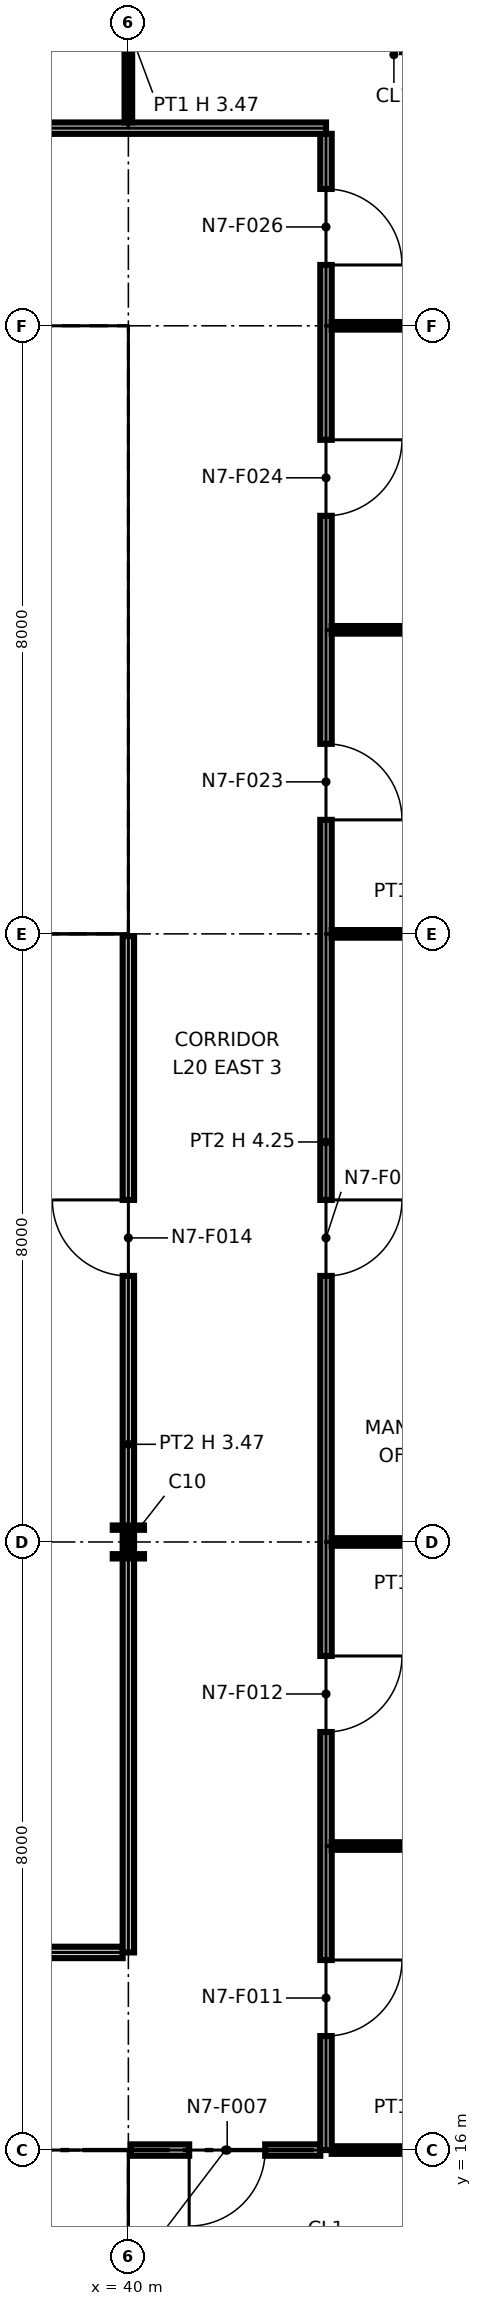
"""IFC4 building model, lengths in metres.
Left out: names, types, materials, properties, quantities, classifications, styles, units other than length and angle.
Written with IfcOpenShell. Run it as: python <this file> out.ifc"""

import sys

from ifc_helpers import new_model, si_unit, direction, frame, frame_2d, origin, origin_2d, place, context, subcontext, project, spatial, polyline, rectangle, i_section, outline, extrude, element, fill, save


model = new_model("IFC4")
c1 = context("Model", 3, precision=1e-05, world=origin(), true_north=direction((0.0, 1.0)))
c2 = subcontext(c1, "Body", "Model", "MODEL_VIEW")
j1 = project(units=[si_unit("LENGTHUNIT", "METRE"), si_unit("PLANEANGLEUNIT", "RADIAN")], contexts=[c1])
p1 = place(None, origin())
s1 = spatial("IfcSite", under=j1, at=p1, CompositionType="ELEMENT")
p2 = place(p1, origin())
s2 = spatial("IfcBuilding", under=s1, at=p2, CompositionType="ELEMENT")
p3 = place(p2, frame((0.0, 0.0, 105.2)))
s3 = spatial("IfcBuildingStorey", under=s2, at=p3, CompositionType="ELEMENT", Elevation=105.2)
p4 = place(p3, frame((40.0, 16.0, 0.0), z_axis=(0.0, 0.0, 1.0), x_axis=(1.0, 0.0, 0.0)))
e1 = element("IfcColumn", 1, at=p4, inside=s3, PredefinedType="COLUMN", context=c2, shape_type="SweptSolid", body=[
    extrude(i_section(OverallWidth=0.406, OverallDepth=0.417, WebThickness=0.03, FlangeThickness=0.048, at=origin_2d()), origin(), (0.0, 0.0, 1.0), 4.25),
])
p5 = place(p3, frame((40.0, 24.0, 0.0), z_axis=(0.0, 0.0, 1.0), x_axis=(1.0, 0.0, 0.0)))
e2 = element("IfcColumn", 2, at=p5, inside=s3, PredefinedType="COLUMN", context=c2, shape_type="SweptSolid", body=[
    extrude(i_section(OverallWidth=0.411, OverallDepth=0.434, WebThickness=0.036, FlangeThickness=0.057, at=origin_2d()), origin(), (0.0, 0.0, 1.0), 4.25),
])
for number, where, z_axis, x_axis in (
    (3, (40.0, 32.0, 0.0), (0.0, 0.0, 1.0), (1.0, 0.0, 0.0)),
    (4, (40.0, 40.0, 0.0), (0.0, 0.0, 1.0), (1.0, 0.0, 0.0)),
):
    element("IfcColumn", number, at=place(p3, frame(where, z_axis=z_axis, x_axis=x_axis)), inside=s3, PredefinedType="COLUMN", context=c2, shape_type="SweptSolid", body=[
        extrude(i_section(OverallWidth=0.257, OverallDepth=0.363, WebThickness=0.013, FlangeThickness=0.022, at=origin_2d()), origin(), (0.0, 0.0, 1.0), 4.25),
    ])
p6 = place(p3, frame((24.65, 15.25, 0.0), z_axis=(0.0, 0.0, 1.0), x_axis=(1.0, 0.0, 0.0)))
e5 = element("IfcWall", 5, at=p6, inside=s3, PredefinedType="PARTITIONING", context=c2, shape_type="SweptSolid", body=[
    extrude(outline(polyline([(0.0, 0.0), (14.7, 0.0), (14.7, 4.25), (7.469, 4.25), (7.469, 3.632), (7.231, 3.632), (7.23, 4.25), (0.0, 4.25), (0.0, 0.0)])), frame((0.0, 0.1, 0.0), z_axis=(0.0, -1.0, 0.0), x_axis=(1.0, 0.0, 0.0)), (0.0, 0.0, 1.0), 0.2),
])
p7 = place(p6, frame((2.85, 0.0, 0.0)))
e6 = element("IfcOpeningElement", 6, at=p7, cuts=e5, PredefinedType="OPENING", context=c2, shape_type="SweptSolid", body=[
    extrude(rectangle(XDim=1.8, YDim=2.1, at=frame_2d((0.9, 1.05))), frame((0.0, 0.11, 0.0), z_axis=(0.0, -1.0, 0.0), x_axis=(1.0, 0.0, 0.0)), (0.0, 0.0, 1.0), 0.22),
])
p8 = place(p6, frame((9.95, 0.0, 0.0), z_axis=(0.0, 0.0, 1.0), x_axis=(-1.0, 0.0, 0.0)))
e7 = element("IfcOpeningElement", 7, at=p8, cuts=e5, PredefinedType="OPENING", context=c2, shape_type="SweptSolid", body=[
    extrude(rectangle(XDim=1.4, YDim=2.1, at=frame_2d((0.7, 1.05))), frame((0.0, 0.11, 0.0), z_axis=(0.0, -1.0, 0.0), x_axis=(1.0, 0.0, 0.0)), (0.0, 0.0, 1.0), 0.22),
])
p9 = place(p6, frame((13.4, 0.0, 0.0), z_axis=(0.0, 0.0, 1.0), x_axis=(-1.0, 0.0, 0.0)))
e8 = element("IfcOpeningElement", 8, at=p9, cuts=e5, PredefinedType="OPENING", context=c2, shape_type="SweptSolid", body=[
    extrude(rectangle(XDim=1.4, YDim=2.1, at=frame_2d((0.7, 1.05))), frame((0.0, 0.11, 0.0), z_axis=(0.0, -1.0, 0.0), x_axis=(1.0, 0.0, 0.0)), (0.0, 0.0, 1.0), 0.22),
])
p10 = place(p3, frame((39.25, 8.85, 0.0), z_axis=(0.0, 0.0, 1.0), x_axis=(0.0, 1.0, 0.0)))
e9 = element("IfcWall", 9, at=p10, inside=s3, PredefinedType="PARTITIONING", context=c2, shape_type="SweptSolid", body=[
    extrude(rectangle(XDim=6.3, YDim=0.2, at=frame_2d((3.15, 0.0))), origin(), (0.0, 0.0, 1.0), 4.25),
])
p11 = place(p3, frame((24.65, 32.75, 0.0), z_axis=(0.0, 0.0, 1.0), x_axis=(1.0, 0.0, 0.0)))
e10 = element("IfcWall", 10, at=p11, inside=s3, PredefinedType="PARTITIONING", context=c2, shape_type="SweptSolid", body=[
    extrude(outline(polyline([(0.0, 0.0), (14.7, 0.0), (14.7, 4.25), (7.469, 4.25), (7.469, 3.632), (7.231, 3.632), (7.23, 4.25), (0.0, 4.25), (0.0, 0.0)])), frame((0.0, 0.1, 0.0), z_axis=(0.0, -1.0, 0.0), x_axis=(1.0, 0.0, 0.0)), (0.0, 0.0, 1.0), 0.2),
])
p12 = place(p11, frame((4.1, 0.0, 0.0)))
e11 = element("IfcOpeningElement", 11, at=p12, cuts=e10, PredefinedType="OPENING", context=c2, shape_type="SweptSolid", body=[
    extrude(rectangle(XDim=1.8, YDim=2.1, at=frame_2d((0.9, 1.05))), frame((0.0, 0.11, 0.0), z_axis=(0.0, -1.0, 0.0), x_axis=(1.0, 0.0, 0.0)), (0.0, 0.0, 1.0), 0.22),
])
p13 = place(p11, frame((8.55, 0.0, 0.0)))
e12 = element("IfcOpeningElement", 12, at=p13, cuts=e10, PredefinedType="OPENING", context=c2, shape_type="SweptSolid", body=[
    extrude(rectangle(XDim=1.4, YDim=2.1, at=frame_2d((0.7, 1.05))), frame((0.0, 0.11, 0.0), z_axis=(0.0, -1.0, 0.0), x_axis=(1.0, 0.0, 0.0)), (0.0, 0.0, 1.0), 0.22),
])
p14 = place(p11, frame((12.0, 0.0, 0.0)))
e13 = element("IfcOpeningElement", 13, at=p14, cuts=e10, PredefinedType="OPENING", context=c2, shape_type="SweptSolid", body=[
    extrude(rectangle(XDim=1.4, YDim=2.1, at=frame_2d((0.7, 1.05))), frame((0.0, 0.11, 0.0), z_axis=(0.0, -1.0, 0.0), x_axis=(1.0, 0.0, 0.0)), (0.0, 0.0, 1.0), 0.22),
])
p15 = place(p3, frame((24.65, 39.25, 0.0), z_axis=(0.0, 0.0, 1.0), x_axis=(1.0, 0.0, 0.0)))
e14 = element("IfcWall", 14, at=p15, inside=s3, PredefinedType="PARTITIONING", context=c2, shape_type="SweptSolid", body=[
    extrude(outline(polyline([(0.0, 0.0), (14.7, 0.0), (14.7, 4.25), (7.469, 4.25), (7.469, 3.632), (7.231, 3.632), (7.23, 4.25), (0.0, 4.25), (0.0, 0.0)])), frame((0.0, 0.1, 0.0), z_axis=(0.0, -1.0, 0.0), x_axis=(1.0, 0.0, 0.0)), (0.0, 0.0, 1.0), 0.2),
])
p16 = place(p3, frame((39.25, 32.85, 0.0), z_axis=(0.0, 0.0, 1.0), x_axis=(0.0, 1.0, 0.0)))
e15 = element("IfcWall", 15, at=p16, inside=s3, PredefinedType="PARTITIONING", context=c2, shape_type="SweptSolid", body=[
    extrude(rectangle(XDim=6.3, YDim=0.2, at=frame_2d((3.15, 0.0))), origin(), (0.0, 0.0, 1.0), 4.25),
])
p17 = place(p3, frame((40.03, 16.0, 0.0), z_axis=(0.0, 0.0, 1.0), x_axis=(1.0, 0.0, 0.0)))
e16 = element("IfcWall", 16, at=p17, inside=s3, PredefinedType="PARTITIONING", context=c2, shape_type="SweptSolid", body=[
    extrude(rectangle(XDim=2.495, YDim=0.15, at=frame_2d((1.248, 0.0))), origin(), (0.0, 0.0, 1.0), 3.47),
])
p18 = place(p17, frame((1.77, 0.0, 0.0), z_axis=(0.0, 0.0, 1.0), x_axis=(-1.0, 0.0, 0.0)))
e17 = element("IfcOpeningElement", 17, at=p18, cuts=e16, PredefinedType="OPENING", context=c2, shape_type="SweptSolid", body=[
    extrude(rectangle(XDim=1.0, YDim=2.1, at=frame_2d((0.5, 1.05))), frame((0.0, 0.085, 0.0), z_axis=(0.0, -1.0, 0.0), x_axis=(1.0, 0.0, 0.0)), (0.0, 0.0, 1.0), 0.17),
])
p19 = place(p3, frame((42.675, 16.0, 0.0), z_axis=(0.0, 0.0, 1.0), x_axis=(1.0, 0.0, 0.0)))
e18 = element("IfcWall", 18, at=p19, inside=s3, PredefinedType="PARTITIONING", context=c2, shape_type="SweptSolid", body=[
    extrude(rectangle(XDim=2.495, YDim=0.1, at=frame_2d((1.248, 0.0))), origin(), (0.0, 0.0, 1.0), 3.47),
])
p20 = place(p3, frame((42.6, 16.0, 0.0), z_axis=(0.0, 0.0, 1.0), x_axis=(0.0, 1.0, 0.0)))
e19 = element("IfcWall", 19, at=p20, inside=s3, PredefinedType="PARTITIONING", context=c2, shape_type="SweptSolid", body=[
    extrude(outline(polyline([(0.0, 0.0), (26.525, 0.0), (26.525, 4.25), (24.3, 4.25), (24.298, 3.47), (23.702, 3.47), (23.7, 4.25), (20.3, 4.25), (20.298, 3.47), (19.702, 3.47), (19.7, 4.25), (16.3, 4.25), (16.298, 3.47), (15.702, 3.47), (15.7, 4.25), (12.3, 4.25), (12.298, 3.47), (11.702, 3.47), (11.7, 4.25), (8.3, 4.25), (8.298, 3.47), (7.702, 3.47), (7.7, 4.25), (4.3, 4.25), (4.298, 3.47), (3.702, 3.47), (3.7, 4.25), (0.0, 4.25), (0.0, 0.0)])), frame((0.0, 0.075, 0.0), z_axis=(0.0, -1.0, 0.0), x_axis=(1.0, 0.0, 0.0)), (0.0, 0.0, 1.0), 0.15),
])
p21 = place(p20, frame((2.5, 0.0, 0.0), z_axis=(0.0, 0.0, 1.0), x_axis=(-1.0, 0.0, 0.0)))
e20 = element("IfcOpeningElement", 20, at=p21, cuts=e19, PredefinedType="OPENING", context=c2, shape_type="SweptSolid", body=[
    extrude(rectangle(XDim=1.0, YDim=2.1, at=frame_2d((0.5, 1.05))), frame((0.0, 0.085, 0.0), z_axis=(0.0, -1.0, 0.0), x_axis=(1.0, 0.0, 0.0)), (0.0, 0.0, 1.0), 0.17),
])
p22 = place(p20, frame((6.5, 0.0, 0.0), z_axis=(0.0, 0.0, 1.0), x_axis=(-1.0, 0.0, 0.0)))
e21 = element("IfcOpeningElement", 21, at=p22, cuts=e19, PredefinedType="OPENING", context=c2, shape_type="SweptSolid", body=[
    extrude(rectangle(XDim=1.0, YDim=2.1, at=frame_2d((0.5, 1.05))), frame((0.0, 0.085, 0.0), z_axis=(0.0, -1.0, 0.0), x_axis=(1.0, 0.0, 0.0)), (0.0, 0.0, 1.0), 0.17),
])
p23 = place(p20, frame((12.5, 0.0, 0.0), z_axis=(0.0, 0.0, 1.0), x_axis=(-1.0, 0.0, 0.0)))
e22 = element("IfcOpeningElement", 22, at=p23, cuts=e19, PredefinedType="OPENING", context=c2, shape_type="SweptSolid", body=[
    extrude(rectangle(XDim=1.0, YDim=2.1, at=frame_2d((0.5, 1.05))), frame((0.0, 0.085, 0.0), z_axis=(0.0, -1.0, 0.0), x_axis=(1.0, 0.0, 0.0)), (0.0, 0.0, 1.0), 0.17),
])
p24 = place(p20, frame((18.5, 0.0, 0.0), z_axis=(0.0, 0.0, 1.0), x_axis=(-1.0, 0.0, 0.0)))
e23 = element("IfcOpeningElement", 23, at=p24, cuts=e19, PredefinedType="OPENING", context=c2, shape_type="SweptSolid", body=[
    extrude(rectangle(XDim=1.0, YDim=2.1, at=frame_2d((0.5, 1.05))), frame((0.0, 0.085, 0.0), z_axis=(0.0, -1.0, 0.0), x_axis=(1.0, 0.0, 0.0)), (0.0, 0.0, 1.0), 0.17),
])
p25 = place(p20, frame((22.5, 0.0, 0.0), z_axis=(0.0, 0.0, 1.0), x_axis=(-1.0, 0.0, 0.0)))
e24 = element("IfcOpeningElement", 24, at=p25, cuts=e19, PredefinedType="OPENING", context=c2, shape_type="SweptSolid", body=[
    extrude(rectangle(XDim=1.0, YDim=2.1, at=frame_2d((0.5, 1.05))), frame((0.0, 0.085, 0.0), z_axis=(0.0, -1.0, 0.0), x_axis=(1.0, 0.0, 0.0)), (0.0, 0.0, 1.0), 0.17),
])
p26 = place(p20, frame((25.8, 0.0, 0.0), z_axis=(0.0, 0.0, 1.0), x_axis=(-1.0, 0.0, 0.0)))
e25 = element("IfcOpeningElement", 25, at=p26, cuts=e19, PredefinedType="OPENING", context=c2, shape_type="SweptSolid", body=[
    extrude(rectangle(XDim=1.0, YDim=2.1, at=frame_2d((0.5, 1.05))), frame((0.0, 0.085, 0.0), z_axis=(0.0, -1.0, 0.0), x_axis=(1.0, 0.0, 0.0)), (0.0, 0.0, 1.0), 0.17),
])
p27 = place(p3, frame((26.675, 18.6, 0.0), z_axis=(0.0, 0.0, 1.0), x_axis=(1.0, 0.0, 0.0)))
e26 = element("IfcWall", 26, at=p27, inside=s3, PredefinedType="PARTITIONING", context=c2, shape_type="SweptSolid", body=[
    extrude(rectangle(XDim=13.25, YDim=0.15, at=frame_2d((6.625, 0.0))), origin(), (0.0, 0.0, 1.0), 4.25),
])
p28 = place(p27, frame((2.325, 0.0, 0.0)))
e27 = element("IfcOpeningElement", 27, at=p28, cuts=e26, PredefinedType="OPENING", context=c2, shape_type="SweptSolid", body=[
    extrude(rectangle(XDim=1.0, YDim=2.1, at=frame_2d((0.5, 1.05))), frame((0.0, 0.085, 0.0), z_axis=(0.0, -1.0, 0.0), x_axis=(1.0, 0.0, 0.0)), (0.0, 0.0, 1.0), 0.17),
])
p29 = place(p3, frame((40.0, 18.6, 0.0), z_axis=(0.0, 0.0, 1.0), x_axis=(0.0, 1.0, 0.0)))
e28 = element("IfcWall", 28, at=p29, inside=s3, PredefinedType="PARTITIONING", context=c2, shape_type="SweptSolid", body=[
    extrude(rectangle(XDim=13.37, YDim=0.15, at=frame_2d((6.685, 0.0))), origin(), (0.0, 0.0, 1.0), 3.47),
])
p30 = place(p29, frame((8.9, 0.0, 0.0)))
e29 = element("IfcOpeningElement", 29, at=p30, cuts=e28, PredefinedType="OPENING", context=c2, shape_type="SweptSolid", body=[
    extrude(rectangle(XDim=1.0, YDim=2.1, at=frame_2d((0.5, 1.05))), frame((0.0, 0.085, 0.0), z_axis=(0.0, -1.0, 0.0), x_axis=(1.0, 0.0, 0.0)), (0.0, 0.0, 1.0), 0.17),
])
p31 = place(p3, frame((42.675, 20.0, 0.0), z_axis=(0.0, 0.0, 1.0), x_axis=(1.0, 0.0, 0.0)))
e30 = element("IfcWall", 30, at=p31, inside=s3, PredefinedType="PARTITIONING", context=c2, shape_type="SweptSolid", body=[
    extrude(rectangle(XDim=5.195, YDim=0.1, at=frame_2d((2.598, 0.0))), origin(), (0.0, 0.0, 1.0), 3.47),
])
for number, where, z_axis, x_axis in (
    (31, (42.675, 24.0, 0.0), (0.0, 0.0, 1.0), (1.0, 0.0, 0.0)),
    (32, (42.675, 32.0, 0.0), (0.0, 0.0, 1.0), (1.0, 0.0, 0.0)),
):
    element("IfcWall", number, at=place(p3, frame(where, z_axis=z_axis, x_axis=x_axis)), inside=s3, PredefinedType="PARTITIONING", context=c2, shape_type="SweptSolid", body=[
        extrude(rectangle(XDim=2.495, YDim=0.1, at=frame_2d((1.248, 0.0))), origin(), (0.0, 0.0, 1.0), 3.47),
    ])
for number, where, z_axis, x_axis in (
    (33, (42.675, 36.0, 0.0), (0.0, 0.0, 1.0), (1.0, 0.0, 0.0)),
    (34, (42.675, 40.0, 0.0), (0.0, 0.0, 1.0), (1.0, 0.0, 0.0)),
):
    element("IfcWall", number, at=place(p3, frame(where, z_axis=z_axis, x_axis=x_axis)), inside=s3, PredefinedType="PARTITIONING", context=c2, shape_type="SweptSolid", body=[
        extrude(rectangle(XDim=5.195, YDim=0.1, at=frame_2d((2.598, 0.0))), origin(), (0.0, 0.0, 1.0), 3.47),
    ])
p32 = place(p3, frame((8.05, 42.6, 0.0), z_axis=(0.0, 0.0, 1.0), x_axis=(1.0, 0.0, 0.0)))
e35 = element("IfcWall", 35, at=p32, inside=s3, PredefinedType="PARTITIONING", context=c2, shape_type="SweptSolid", body=[
    extrude(rectangle(XDim=34.55, YDim=0.15, at=frame_2d((17.275, 0.0))), origin(), (0.0, 0.0, 1.0), 4.25),
])
p33 = place(p32, frame((9.45, 0.0, 0.0)))
e36 = element("IfcOpeningElement", 36, at=p33, cuts=e35, PredefinedType="OPENING", context=c2, shape_type="SweptSolid", body=[
    extrude(rectangle(XDim=1.0, YDim=2.1, at=frame_2d((0.5, 1.05))), frame((0.0, 0.085, 0.0), z_axis=(0.0, -1.0, 0.0), x_axis=(1.0, 0.0, 0.0)), (0.0, 0.0, 1.0), 0.17),
])
p34 = place(p32, frame((13.45, 0.0, 0.0)))
e37 = element("IfcOpeningElement", 37, at=p34, cuts=e35, PredefinedType="OPENING", context=c2, shape_type="SweptSolid", body=[
    extrude(rectangle(XDim=1.0, YDim=2.1, at=frame_2d((0.5, 1.05))), frame((0.0, 0.085, 0.0), z_axis=(0.0, -1.0, 0.0), x_axis=(1.0, 0.0, 0.0)), (0.0, 0.0, 1.0), 0.17),
])
p35 = place(p32, frame((25.45, 0.0, 0.0)))
e38 = element("IfcOpeningElement", 38, at=p35, cuts=e35, PredefinedType="OPENING", context=c2, shape_type="SweptSolid", body=[
    extrude(rectangle(XDim=1.0, YDim=2.1, at=frame_2d((0.5, 1.05))), frame((0.0, 0.085, 0.0), z_axis=(0.0, -1.0, 0.0), x_axis=(1.0, 0.0, 0.0)), (0.0, 0.0, 1.0), 0.17),
])
p36 = place(p32, frame((29.45, 0.0, 0.0)))
e39 = element("IfcOpeningElement", 39, at=p36, cuts=e35, PredefinedType="OPENING", context=c2, shape_type="SweptSolid", body=[
    extrude(rectangle(XDim=1.0, YDim=2.1, at=frame_2d((0.5, 1.05))), frame((0.0, 0.085, 0.0), z_axis=(0.0, -1.0, 0.0), x_axis=(1.0, 0.0, 0.0)), (0.0, 0.0, 1.0), 0.17),
])
p37 = place(p32, frame((1.45, 0.0, 0.0)))
e40 = element("IfcOpeningElement", 40, at=p37, cuts=e35, PredefinedType="OPENING", context=c2, shape_type="SweptSolid", body=[
    extrude(rectangle(XDim=1.0, YDim=2.1, at=frame_2d((0.5, 1.05))), frame((0.0, 0.085, 0.0), z_axis=(0.0, -1.0, 0.0), x_axis=(1.0, 0.0, 0.0)), (0.0, 0.0, 1.0), 0.17),
])
p38 = place(p32, frame((5.45, 0.0, 0.0)))
e41 = element("IfcOpeningElement", 41, at=p38, cuts=e35, PredefinedType="OPENING", context=c2, shape_type="SweptSolid", body=[
    extrude(rectangle(XDim=1.0, YDim=2.1, at=frame_2d((0.5, 1.05))), frame((0.0, 0.085, 0.0), z_axis=(0.0, -1.0, 0.0), x_axis=(1.0, 0.0, 0.0)), (0.0, 0.0, 1.0), 0.17),
])
p39 = place(p32, frame((17.45, 0.0, 0.0)))
e42 = element("IfcOpeningElement", 42, at=p39, cuts=e35, PredefinedType="OPENING", context=c2, shape_type="SweptSolid", body=[
    extrude(rectangle(XDim=1.0, YDim=2.1, at=frame_2d((0.5, 1.05))), frame((0.0, 0.085, 0.0), z_axis=(0.0, -1.0, 0.0), x_axis=(1.0, 0.0, 0.0)), (0.0, 0.0, 1.0), 0.17),
])
p40 = place(p32, frame((21.45, 0.0, 0.0)))
e43 = element("IfcOpeningElement", 43, at=p40, cuts=e35, PredefinedType="OPENING", context=c2, shape_type="SweptSolid", body=[
    extrude(rectangle(XDim=1.0, YDim=2.1, at=frame_2d((0.5, 1.05))), frame((0.0, 0.085, 0.0), z_axis=(0.0, -1.0, 0.0), x_axis=(1.0, 0.0, 0.0)), (0.0, 0.0, 1.0), 0.17),
])
p41 = place(p3, frame((40.0, 42.675, 0.0), z_axis=(0.0, 0.0, 1.0), x_axis=(0.0, 1.0, 0.0)))
e44 = element("IfcWall", 44, at=p41, inside=s3, PredefinedType="PARTITIONING", context=c2, shape_type="SweptSolid", body=[
    extrude(rectangle(XDim=2.495, YDim=0.1, at=frame_2d((1.248, 0.0))), origin(), (0.0, 0.0, 1.0), 3.47),
])
p42 = place(p18, origin())
e45 = element("IfcDoor", 45, at=p42, inside=s3, OperationType="SINGLE_SWING_RIGHT", PredefinedType="DOOR", context=c2, shape_type="SweptSolid", body=[
    extrude(rectangle(XDim=1.0, YDim=2.1, at=frame_2d((0.5, 1.05))), frame((0.0, 0.025, 0.0), z_axis=(0.0, -1.0, 0.0), x_axis=(1.0, 0.0, 0.0)), (0.0, 0.0, 1.0), 0.05),
])
fill(e17, e45)
p43 = place(p21, origin())
e46 = element("IfcDoor", 46, at=p43, inside=s3, OperationType="SINGLE_SWING_LEFT", PredefinedType="DOOR", context=c2, shape_type="SweptSolid", body=[
    extrude(rectangle(XDim=1.0, YDim=2.1, at=frame_2d((0.5, 1.05))), frame((0.0, 0.025, 0.0), z_axis=(0.0, -1.0, 0.0), x_axis=(1.0, 0.0, 0.0)), (0.0, 0.0, 1.0), 0.05),
])
fill(e20, e46)
p44 = place(p22, origin())
e47 = element("IfcDoor", 47, at=p44, inside=s3, OperationType="SINGLE_SWING_LEFT", PredefinedType="DOOR", context=c2, shape_type="SweptSolid", body=[
    extrude(rectangle(XDim=1.0, YDim=2.1, at=frame_2d((0.5, 1.05))), frame((0.0, 0.025, 0.0), z_axis=(0.0, -1.0, 0.0), x_axis=(1.0, 0.0, 0.0)), (0.0, 0.0, 1.0), 0.05),
])
fill(e21, e47)
p45 = place(p30, origin())
e48 = element("IfcDoor", 48, at=p45, inside=s3, OperationType="SINGLE_SWING_RIGHT", PredefinedType="DOOR", context=c2, shape_type="SweptSolid", body=[
    extrude(rectangle(XDim=1.0, YDim=2.1, at=frame_2d((0.5, 1.05))), frame((0.0, 0.025, 0.0), z_axis=(0.0, -1.0, 0.0), x_axis=(1.0, 0.0, 0.0)), (0.0, 0.0, 1.0), 0.05),
])
fill(e29, e48)
p46 = place(p23, origin())
e49 = element("IfcDoor", 49, at=p46, inside=s3, OperationType="SINGLE_SWING_LEFT", PredefinedType="DOOR", context=c2, shape_type="SweptSolid", body=[
    extrude(rectangle(XDim=1.0, YDim=2.1, at=frame_2d((0.5, 1.05))), frame((0.0, 0.025, 0.0), z_axis=(0.0, -1.0, 0.0), x_axis=(1.0, 0.0, 0.0)), (0.0, 0.0, 1.0), 0.05),
])
fill(e22, e49)
p47 = place(p24, origin())
e50 = element("IfcDoor", 50, at=p47, inside=s3, OperationType="SINGLE_SWING_RIGHT", PredefinedType="DOOR", context=c2, shape_type="SweptSolid", body=[
    extrude(rectangle(XDim=1.0, YDim=2.1, at=frame_2d((0.5, 1.05))), frame((0.0, 0.025, 0.0), z_axis=(0.0, -1.0, 0.0), x_axis=(1.0, 0.0, 0.0)), (0.0, 0.0, 1.0), 0.05),
])
fill(e23, e50)
p48 = place(p25, origin())
e51 = element("IfcDoor", 51, at=p48, inside=s3, OperationType="SINGLE_SWING_LEFT", PredefinedType="DOOR", context=c2, shape_type="SweptSolid", body=[
    extrude(rectangle(XDim=1.0, YDim=2.1, at=frame_2d((0.5, 1.05))), frame((0.0, 0.025, 0.0), z_axis=(0.0, -1.0, 0.0), x_axis=(1.0, 0.0, 0.0)), (0.0, 0.0, 1.0), 0.05),
])
fill(e24, e51)
p49 = place(p26, origin())
e52 = element("IfcDoor", 52, at=p49, inside=s3, OperationType="SINGLE_SWING_RIGHT", PredefinedType="DOOR", context=c2, shape_type="SweptSolid", body=[
    extrude(rectangle(XDim=1.0, YDim=2.1, at=frame_2d((0.5, 1.05))), frame((0.0, 0.025, 0.0), z_axis=(0.0, -1.0, 0.0), x_axis=(1.0, 0.0, 0.0)), (0.0, 0.0, 1.0), 0.05),
])
fill(e25, e52)
save(model, sys.argv[1])
